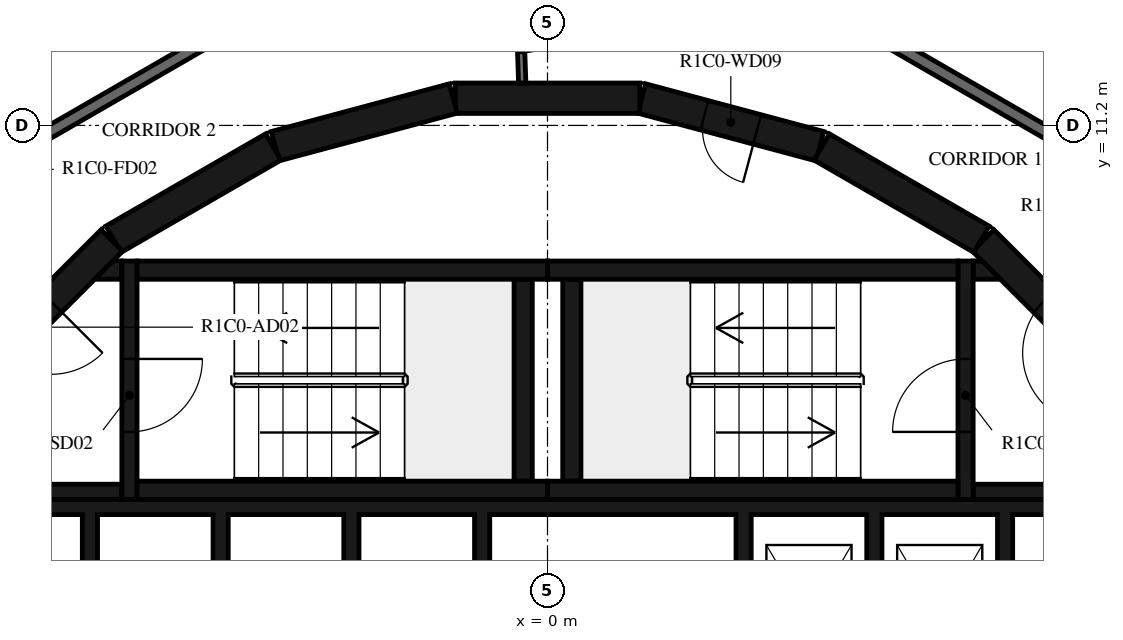
"""IFC4 building model, lengths in metres.
Left out: names, types, materials, properties, quantities, classifications, styles, units other than length and angle.
Written with IfcOpenShell. Run it as: python <this file> out.ifc"""

import sys

from ifc_helpers import new_model, si_unit, direction, frame, frame_2d, origin, place, context, subcontext, project, spatial, polyline, rectangle, outline, extrude, element, fill, save


model = new_model("IFC4")
c1 = context("Model", 3, precision=1e-05, world=origin(), true_north=direction((0.0, 1.0)))
c2 = subcontext(c1, "Body", "Model", "MODEL_VIEW")
j1 = project(units=[si_unit("LENGTHUNIT", "METRE"), si_unit("PLANEANGLEUNIT", "RADIAN")], contexts=[c1])
p1 = place(None, origin())
s1 = spatial("IfcSite", under=j1, at=p1, CompositionType="ELEMENT")
p2 = place(p1, origin())
s2 = spatial("IfcBuilding", under=s1, at=p2, CompositionType="ELEMENT")
p3 = place(p2, frame((0.0, 0.0, 66.4)))
s3 = spatial("IfcBuildingStorey", under=s2, at=p3, CompositionType="ELEMENT", Elevation=66.4)
p4 = place(p3, frame((9.308, 7.164, 0.0), z_axis=(0.0, 0.0, 1.0), x_axis=(-0.707106781187, 0.707106781187, 0.0)))
e1 = element("IfcWall", 1, at=p4, inside=s3, PredefinedType="SHEAR", context=c2, shape_type="SweptSolid", body=[
    extrude(rectangle(XDim=3.032, YDim=0.5, at=frame_2d((1.516, 0.0))), origin(), (0.0, 0.0, 1.0), 3.05),
])
p5 = place(p4, frame((0.416, 0.0, 0.0)))
e2 = element("IfcOpeningElement", 2, at=p5, cuts=e1, PredefinedType="OPENING", context=c2, shape_type="SweptSolid", body=[
    extrude(rectangle(XDim=1.2, YDim=2.1, at=frame_2d((0.6, 1.05))), frame((0.0, 0.26, 0.0), z_axis=(0.0, -1.0, 0.0), x_axis=(1.0, 0.0, 0.0)), (0.0, 0.0, 1.0), 0.52),
])
p6 = place(p3, frame((7.137, 9.329, 0.0), z_axis=(0.0, 0.0, 1.0), x_axis=(-0.865975092491, 0.500087131594, 0.0)))
e3 = element("IfcWall", 3, at=p6, inside=s3, PredefinedType="SHEAR", context=c2, shape_type="SweptSolid", body=[
    extrude(rectangle(XDim=3.033, YDim=0.5, at=frame_2d((1.516, 0.0))), origin(), (0.0, 0.0, 1.0), 3.05),
])
p7 = place(p3, frame((4.479, 10.858, 0.0), z_axis=(0.0, 0.0, 1.0), x_axis=(-0.965948410781, 0.258734743916, 0.0)))
e4 = element("IfcWall", 4, at=p7, inside=s3, PredefinedType="SHEAR", context=c2, shape_type="SweptSolid", body=[
    extrude(rectangle(XDim=3.033, YDim=0.5, at=frame_2d((1.516, 0.0))), origin(), (0.0, 0.0, 1.0), 3.05),
])
p8 = place(p7, frame((1.066, 0.0, 0.0)))
e5 = element("IfcOpeningElement", 5, at=p8, cuts=e4, PredefinedType="OPENING", context=c2, shape_type="SweptSolid", body=[
    extrude(rectangle(XDim=0.9, YDim=2.1, at=frame_2d((0.45, 1.05))), frame((0.0, 0.26, 0.0), z_axis=(0.0, -1.0, 0.0), x_axis=(1.0, 0.0, 0.0)), (0.0, 0.0, 1.0), 0.52),
])
for number, where, z_axis, x_axis in (
    (6, (1.516, 11.647, 0.0), (0.0, 0.0, 1.0), (-1.0, 0.0, 0.0)),
    (7, (-1.55, 11.643, 0.0), (0.0, 0.0, 1.0), (-0.966, -0.259, 0.0)),
    (8, (-4.51, 10.845, 0.0), (0.0, 0.0, 1.0), (-0.866, -0.5, 0.0)),
):
    element("IfcWall", number, at=place(p3, frame(where, z_axis=z_axis, x_axis=x_axis)), inside=s3, PredefinedType="SHEAR", context=c2, shape_type="SweptSolid", body=[
        extrude(rectangle(XDim=3.033, YDim=0.5, at=frame_2d((1.516, 0.0))), origin(), (0.0, 0.0, 1.0), 3.05),
    ])
p9 = place(p3, frame((-7.164, 9.308, 0.0), z_axis=(0.0, 0.0, 1.0), x_axis=(-0.707106781187, -0.707106781187, 0.0)))
e9 = element("IfcWall", 9, at=p9, inside=s3, PredefinedType="SHEAR", context=c2, shape_type="SweptSolid", body=[
    extrude(rectangle(XDim=3.032, YDim=0.5, at=frame_2d((1.516, 0.0))), origin(), (0.0, 0.0, 1.0), 3.05),
])
p10 = place(p9, frame((1.416, 0.0, 0.0)))
e10 = element("IfcOpeningElement", 10, at=p10, cuts=e9, PredefinedType="OPENING", context=c2, shape_type="SweptSolid", body=[
    extrude(rectangle(XDim=1.2, YDim=2.1, at=frame_2d((0.6, 1.05))), frame((0.0, 0.26, 0.0), z_axis=(0.0, -1.0, 0.0), x_axis=(1.0, 0.0, 0.0)), (0.0, 0.0, 1.0), 0.52),
])
for number, where, z_axis, x_axis in (
    (11, (0.0, 5.2, 0.0), (0.0, 0.0, 1.0), (1.0, 0.0, 0.0)),
    (12, (0.0, 8.82, 0.0), (0.0, 0.0, 1.0), (1.0, 0.0, 0.0)),
):
    element("IfcWall", number, at=place(p3, frame(where, z_axis=z_axis, x_axis=x_axis)), inside=s3, PredefinedType="SHEAR", context=c2, shape_type="SweptSolid", body=[
        extrude(rectangle(XDim=6.75, YDim=0.3, at=frame_2d((3.375, 0.0))), origin(), (0.0, 0.0, 1.0), 3.05),
    ])
p11 = place(p3, frame((0.4, 5.35, 0.0), z_axis=(0.0, 0.0, 1.0), x_axis=(0.0, 1.0, 0.0)))
e13 = element("IfcWall", 13, at=p11, inside=s3, PredefinedType="SHEAR", context=c2, shape_type="SweptSolid", body=[
    extrude(rectangle(XDim=3.32, YDim=0.3, at=frame_2d((1.66, 0.0))), origin(), (0.0, 0.0, 1.0), 3.05),
])
p12 = place(p3, frame((6.875, 5.05, 0.0), z_axis=(0.0, 0.0, 1.0), x_axis=(0.0, 1.0, 0.0)))
e14 = element("IfcWall", 14, at=p12, inside=s3, PredefinedType="SHEAR", context=c2, shape_type="SweptSolid", body=[
    extrude(rectangle(XDim=3.92, YDim=0.25, at=frame_2d((1.96, 0.0))), origin(), (0.0, 0.0, 1.0), 3.05),
])
p13 = place(p12, frame((1.11, 0.0, 0.0)))
e15 = element("IfcOpeningElement", 15, at=p13, cuts=e14, PredefinedType="OPENING", context=c2, shape_type="SweptSolid", body=[
    extrude(rectangle(XDim=1.2, YDim=2.1, at=frame_2d((0.6, 1.05))), frame((0.0, 0.135, 0.0), z_axis=(0.0, -1.0, 0.0), x_axis=(1.0, 0.0, 0.0)), (0.0, 0.0, 1.0), 0.27),
])
p14 = place(p3, frame((7.0, 5.175, 0.0), z_axis=(0.0, 0.0, 1.0), x_axis=(1.0, 0.0, 0.0)))
e16 = element("IfcWall", 16, at=p14, inside=s3, PredefinedType="SHEAR", context=c2, shape_type="SweptSolid", body=[
    extrude(rectangle(XDim=3.1, YDim=0.25, at=frame_2d((1.55, 0.0))), origin(), (0.0, 0.0, 1.0), 3.05),
])
p15 = place(p3, origin())
e17 = element("IfcWall", 17, at=p15, inside=s3, PredefinedType="SHEAR", context=c2, shape_type="SweptSolid", body=[
    extrude(outline(polyline([(7.448, 8.67), (7.0, 8.67), (7.0, 8.97), (7.148, 8.97), (7.448, 8.67)])), origin(), (0.0, 0.0, 1.0), 3.05),
])
for number, where, z_axis, x_axis in (
    (18, (-6.75, 5.2, 0.0), (0.0, 0.0, 1.0), (1.0, 0.0, 0.0)),
    (19, (-6.75, 8.82, 0.0), (0.0, 0.0, 1.0), (1.0, 0.0, 0.0)),
):
    element("IfcWall", number, at=place(p3, frame(where, z_axis=z_axis, x_axis=x_axis)), inside=s3, PredefinedType="SHEAR", context=c2, shape_type="SweptSolid", body=[
        extrude(rectangle(XDim=6.75, YDim=0.3, at=frame_2d((3.375, 0.0))), origin(), (0.0, 0.0, 1.0), 3.05),
    ])
p16 = place(p3, frame((-0.4, 5.35, 0.0), z_axis=(0.0, 0.0, 1.0), x_axis=(0.0, 1.0, 0.0)))
e20 = element("IfcWall", 20, at=p16, inside=s3, PredefinedType="SHEAR", context=c2, shape_type="SweptSolid", body=[
    extrude(rectangle(XDim=3.32, YDim=0.3, at=frame_2d((1.66, 0.0))), origin(), (0.0, 0.0, 1.0), 3.05),
])
p17 = place(p3, frame((-6.875, 8.97, 0.0), z_axis=(0.0, 0.0, 1.0), x_axis=(0.0, -1.0, 0.0)))
e21 = element("IfcWall", 21, at=p17, inside=s3, PredefinedType="SHEAR", context=c2, shape_type="SweptSolid", body=[
    extrude(rectangle(XDim=3.92, YDim=0.25, at=frame_2d((1.96, 0.0))), origin(), (0.0, 0.0, 1.0), 3.05),
])
p18 = place(p17, frame((1.61, 0.0, 0.0)))
e22 = element("IfcOpeningElement", 22, at=p18, cuts=e21, PredefinedType="OPENING", context=c2, shape_type="SweptSolid", body=[
    extrude(rectangle(XDim=1.2, YDim=2.1, at=frame_2d((0.6, 1.05))), frame((0.0, 0.135, 0.0), z_axis=(0.0, -1.0, 0.0), x_axis=(1.0, 0.0, 0.0)), (0.0, 0.0, 1.0), 0.27),
])
p19 = place(p3, frame((-7.0, 5.175, 0.0), z_axis=(0.0, 0.0, 1.0), x_axis=(-1.0, 0.0, 0.0)))
e23 = element("IfcWall", 23, at=p19, inside=s3, PredefinedType="SHEAR", context=c2, shape_type="SweptSolid", body=[
    extrude(rectangle(XDim=3.1, YDim=0.25, at=frame_2d((1.55, 0.0))), origin(), (0.0, 0.0, 1.0), 3.05),
])
p20 = place(p3, origin())
e24 = element("IfcWall", 24, at=p20, inside=s3, PredefinedType="SHEAR", context=c2, shape_type="SweptSolid", body=[
    extrude(outline(polyline([(-7.148, 8.97), (-7.0, 8.97), (-7.0, 8.67), (-7.448, 8.67), (-7.148, 8.97)])), origin(), (0.0, 0.0, 1.0), 3.05),
])
p21 = place(p3, origin())
e25 = element("IfcWall", 25, at=p21, inside=s3, PredefinedType="SHEAR", context=c2, shape_type="SweptSolid", body=[
    extrude(outline(polyline([(-9.55, 4.8), (-7.65, 4.8), (-7.65, 1.9), (-7.4, 1.9), (-7.4, 4.8), (-5.5, 4.8), (-5.5, 1.9), (-5.25, 1.9), (-5.25, 4.8), (-3.35, 4.8), (-3.35, 1.9), (-3.1, 1.9), (-3.1, 4.8), (-1.2, 4.8), (-1.2, 1.9), (-0.95, 1.9), (-0.95, 4.8), (3.1, 4.8), (3.1, 1.9), (3.35, 1.9), (3.35, 4.8), (5.25, 4.8), (5.25, 1.9), (5.5, 1.9), (5.5, 4.8), (7.4, 4.8), (7.4, 1.9), (7.65, 1.9), (7.65, 4.8), (9.55, 4.8), (9.55, 1.9), (9.8, 1.9), (9.8, 4.8), (9.8, 5.05), (-9.8, 5.05), (-9.8, 4.8), (-9.8, 1.9), (-9.55, 1.9), (-9.55, 4.8)])), origin(), (0.0, 0.0, 1.0), 3.05),
])
p22 = place(p3, frame((-0.479, 13.7, 0.0), z_axis=(0.0, 0.0, 1.0), x_axis=(0.034919103017, -0.999390142159, 0.0)))
e26 = element("IfcWall", 26, at=p22, inside=s3, PredefinedType="PARTITIONING", context=c2, shape_type="SweptSolid", body=[
    extrude(rectangle(XDim=1.804, YDim=0.12, at=frame_2d((0.902, 0.0))), origin(), (0.0, 0.0, 1.0), 3.05),
])
p23 = place(p22, frame((0.11, 0.0, 0.0)))
e27 = element("IfcOpeningElement", 27, at=p23, cuts=e26, PredefinedType="OPENING", context=c2, shape_type="SweptSolid", body=[
    extrude(rectangle(XDim=1.2, YDim=2.1, at=frame_2d((0.6, 1.05))), frame((0.0, 0.07, 0.0), z_axis=(0.0, -1.0, 0.0), x_axis=(1.0, 0.0, 0.0)), (0.0, 0.0, 1.0), 0.14),
])
p24 = place(p3, frame((10.029, 10.029, 0.0), z_axis=(0.0, 0.0, 1.0), x_axis=(-0.866024439905, 0.500001669485, 0.0)))
e28 = element("IfcWall", 28, at=p24, inside=s3, PredefinedType="STANDARD", context=c2, shape_type="SweptSolid", body=[
    extrude(rectangle(XDim=7.342, YDim=0.2, at=frame_2d((3.671, 0.0))), origin(), (0.0, 0.0, 1.0), 3.05),
])
p25 = place(p3, frame((-3.671, 13.7, 0.0), z_axis=(0.0, 0.0, 1.0), x_axis=(-0.866031419417, -0.499989580474, 0.0)))
e29 = element("IfcWall", 29, at=p25, inside=s3, PredefinedType="STANDARD", context=c2, shape_type="SweptSolid", body=[
    extrude(rectangle(XDim=7.147, YDim=0.2, at=frame_2d((3.573, 0.0))), origin(), (0.0, 0.0, 1.0), 3.05),
])
p26 = place(p25, frame((5.947, 0.0, 0.0)))
e30 = element("IfcOpeningElement", 30, at=p26, cuts=e29, PredefinedType="OPENING", context=c2, shape_type="SweptSolid", body=[
    extrude(rectangle(XDim=1.0, YDim=2.1, at=frame_2d((0.5, 1.05))), frame((0.0, 0.11, 0.0), z_axis=(0.0, -1.0, 0.0), x_axis=(1.0, 0.0, 0.0)), (0.0, 0.0, 1.0), 0.22),
])
p27 = place(p3, frame((11.127, 11.127, 0.0), z_axis=(0.0, 0.0, 1.0), x_axis=(-0.86602299963, 0.500004164094, 0.0)))
e31 = element("IfcWall", 31, at=p27, inside=s3, PredefinedType="PARTITIONING", context=c2, shape_type="SweptSolid", body=[
    extrude(rectangle(XDim=7.052, YDim=0.12, at=frame_2d((3.526, 0.0))), origin(), (0.0, 0.0, 1.0), 3.05),
])
p28 = place(p27, frame((1.4, 0.0, 0.0)))
e32 = element("IfcOpeningElement", 32, at=p28, cuts=e31, PredefinedType="OPENING", context=c2, shape_type="SweptSolid", body=[
    extrude(rectangle(XDim=0.8, YDim=2.1, at=frame_2d((0.4, 1.05))), frame((0.0, 0.07, 0.0), z_axis=(0.0, -1.0, 0.0), x_axis=(1.0, 0.0, 0.0)), (0.0, 0.0, 1.0), 0.14),
])
p29 = place(p13, origin())
e33 = element("IfcDoor", 33, at=p29, inside=s3, OperationType="SINGLE_SWING_LEFT", PredefinedType="DOOR", context=c2, shape_type="SweptSolid", body=[
    extrude(rectangle(XDim=1.2, YDim=2.1, at=frame_2d((0.6, 1.05))), frame((0.0, 0.025, 0.0), z_axis=(0.0, -1.0, 0.0), x_axis=(1.0, 0.0, 0.0)), (0.0, 0.0, 1.0), 0.05),
])
fill(e15, e33)
p30 = place(p5, origin())
e34 = element("IfcDoor", 34, at=p30, inside=s3, OperationType="SINGLE_SWING_RIGHT", PredefinedType="DOOR", context=c2, shape_type="SweptSolid", body=[
    extrude(rectangle(XDim=1.2, YDim=2.1, at=frame_2d((0.6, 1.05))), frame((0.0, 0.025, 0.0), z_axis=(0.0, -1.0, 0.0), x_axis=(1.0, 0.0, 0.0)), (0.0, 0.0, 1.0), 0.05),
])
fill(e2, e34)
p31 = place(p18, origin())
e35 = element("IfcDoor", 35, at=p31, inside=s3, OperationType="SINGLE_SWING_LEFT", PredefinedType="DOOR", context=c2, shape_type="SweptSolid", body=[
    extrude(rectangle(XDim=1.2, YDim=2.1, at=frame_2d((0.6, 1.05))), frame((0.0, 0.025, 0.0), z_axis=(0.0, -1.0, 0.0), x_axis=(1.0, 0.0, 0.0)), (0.0, 0.0, 1.0), 0.05),
])
fill(e22, e35)
p32 = place(p10, origin())
e36 = element("IfcDoor", 36, at=p32, inside=s3, OperationType="SINGLE_SWING_RIGHT", PredefinedType="DOOR", context=c2, shape_type="SweptSolid", body=[
    extrude(rectangle(XDim=1.2, YDim=2.1, at=frame_2d((0.6, 1.05))), frame((0.0, 0.025, 0.0), z_axis=(0.0, -1.0, 0.0), x_axis=(1.0, 0.0, 0.0)), (0.0, 0.0, 1.0), 0.05),
])
fill(e10, e36)
p33 = place(p8, origin())
e37 = element("IfcDoor", 37, at=p33, inside=s3, OperationType="SINGLE_SWING_RIGHT", PredefinedType="DOOR", context=c2, shape_type="SweptSolid", body=[
    extrude(rectangle(XDim=0.9, YDim=2.1, at=frame_2d((0.45, 1.05))), frame((0.0, 0.025, 0.0), z_axis=(0.0, -1.0, 0.0), x_axis=(1.0, 0.0, 0.0)), (0.0, 0.0, 1.0), 0.05),
])
fill(e5, e37)
p34 = place(p23, origin())
e38 = element("IfcDoor", 38, at=p34, inside=s3, OperationType="DOUBLE_DOOR_SINGLE_SWING", PredefinedType="DOOR", context=c2, shape_type="SweptSolid", body=[
    extrude(rectangle(XDim=1.2, YDim=2.1, at=frame_2d((0.6, 1.05))), frame((0.0, 0.025, 0.0), z_axis=(0.0, -1.0, 0.0), x_axis=(1.0, 0.0, 0.0)), (0.0, 0.0, 1.0), 0.05),
])
fill(e27, e38)
save(model, sys.argv[1])
